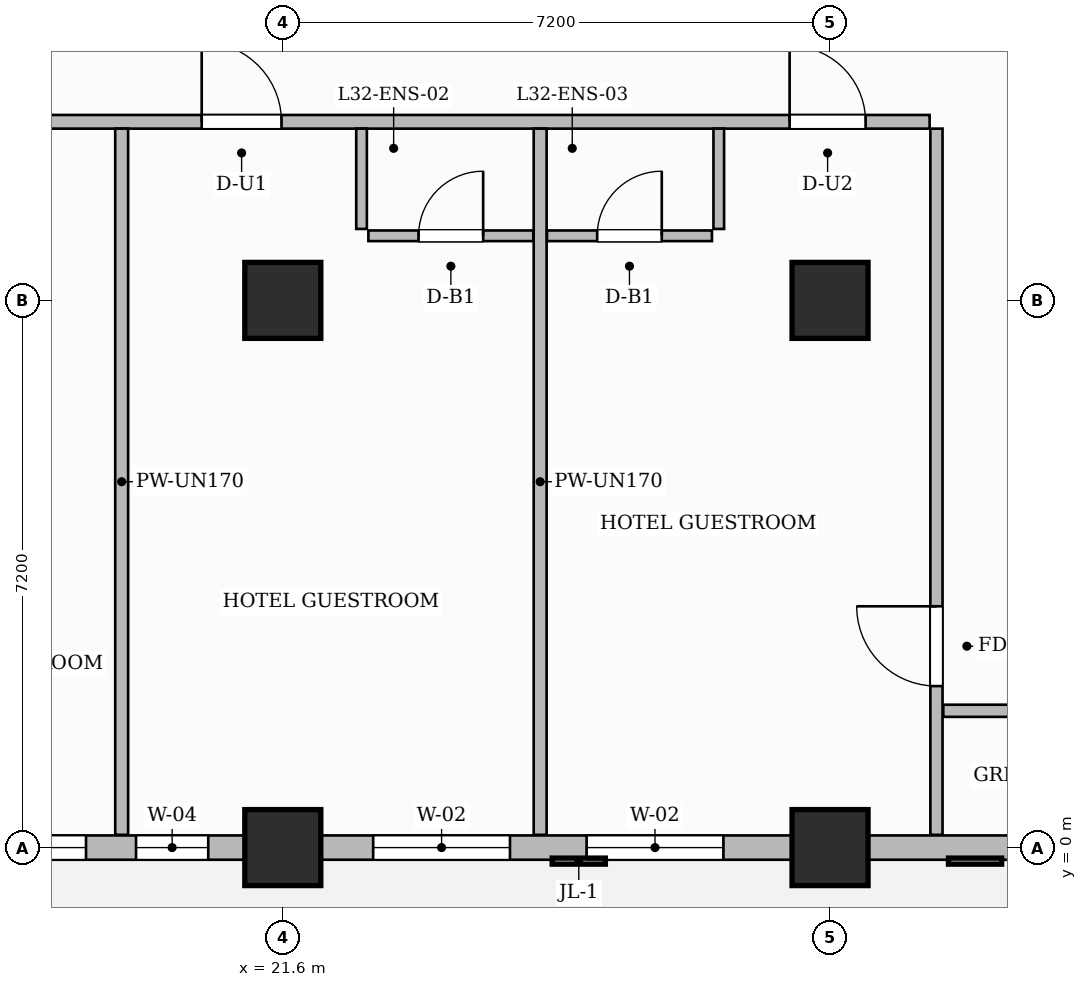
"""IFC4 building model, lengths in metres.
Left out: names, types, materials, properties, quantities, classifications, styles, units other than length and angle.
Written with IfcOpenShell. Run it as: python <this file> out.ifc"""

import sys

from ifc_helpers import new_model, si_unit, direction, frame, frame_2d, origin, origin_2d, place, context, subcontext, project, spatial, rectangle, extrude, source, transform, mapped, element, fill, save


model = new_model("IFC4")
c1 = context("Model", 3, precision=1e-05, world=origin(), true_north=direction((0.0, 1.0)))
c2 = subcontext(c1, "Body", "Model", "MODEL_VIEW")
j1 = project(units=[si_unit("LENGTHUNIT", "METRE"), si_unit("PLANEANGLEUNIT", "RADIAN")], contexts=[c1])
p1 = place(None, origin())
s1 = spatial("IfcSite", under=j1, at=p1, CompositionType="ELEMENT")
p2 = place(p1, origin())
s2 = spatial("IfcBuilding", under=s1, at=p2, CompositionType="ELEMENT")
p3 = place(p2, frame((0.0, 0.0, 130.3)))
s3 = spatial("IfcBuildingStorey", under=s2, at=p3, CompositionType="ELEMENT", Elevation=130.3)
m1 = source(origin(), c2, "Body", "SweptSolid", [
    extrude(rectangle(XDim=1.0, YDim=1.0, at=origin_2d()), origin(), (0.0, 0.0, 1.0), 3.7),
])
for number, where, z_axis, x_axis in (
    (1, (21.6, 0.0, 0.0), (0.0, 0.0, 1.0), (1.0, 0.0, 0.0)),
    (2, (21.6, 7.2, 0.0), (0.0, 0.0, 1.0), (1.0, 0.0, 0.0)),
    (3, (28.8, 0.0, 0.0), (0.0, 0.0, 1.0), (1.0, 0.0, 0.0)),
    (4, (28.8, 7.2, 0.0), (0.0, 0.0, 1.0), (1.0, 0.0, 0.0)),
):
    element("IfcColumn", number, at=place(p3, frame(where, z_axis=z_axis, x_axis=x_axis)), inside=s3, PredefinedType="COLUMN", context=c2, shape_type="MappedRepresentation", body=[
        mapped(m1, transform((0.0, 0.0, 0.0), scale=1.0)),
    ])
p4 = place(p3, frame((14.568, 9.55, 0.0), z_axis=(0.0, 0.0, 1.0), x_axis=(1.0, 0.0, 0.0)))
e5 = element("IfcWall", 5, at=p4, inside=s3, PredefinedType="PARTITIONING", context=c2, shape_type="SweptSolid", body=[
    extrude(rectangle(XDim=15.542, YDim=0.18, at=frame_2d((7.771, 0.0))), origin(), (0.0, 0.0, 1.0), 3.45),
])
p5 = place(p4, frame((2.888, 0.0, 0.0)))
e6 = element("IfcOpeningElement", 6, at=p5, cuts=e5, PredefinedType="OPENING", context=c2, shape_type="SweptSolid", body=[
    extrude(rectangle(XDim=1.0, YDim=2.2, at=frame_2d((0.5, 1.1))), frame((0.0, 0.1, 0.0), z_axis=(0.0, -1.0, 0.0), x_axis=(1.0, 0.0, 0.0)), (0.0, 0.0, 1.0), 0.2),
])
p6 = place(p4, frame((5.965, 0.0, 0.0)))
e7 = element("IfcOpeningElement", 7, at=p6, cuts=e5, PredefinedType="OPENING", context=c2, shape_type="SweptSolid", body=[
    extrude(rectangle(XDim=1.05, YDim=2.25, at=frame_2d((0.525, 1.125))), frame((0.0, 0.1, 0.0), z_axis=(0.0, -1.0, 0.0), x_axis=(1.0, 0.0, 0.0)), (0.0, 0.0, 1.0), 0.2),
])
p7 = place(p4, frame((13.7, 0.0, 0.0)))
e8 = element("IfcOpeningElement", 8, at=p7, cuts=e5, PredefinedType="OPENING", context=c2, shape_type="SweptSolid", body=[
    extrude(rectangle(XDim=1.0, YDim=2.2, at=frame_2d((0.5, 1.1))), frame((0.0, 0.1, 0.0), z_axis=(0.0, -1.0, 0.0), x_axis=(1.0, 0.0, 0.0)), (0.0, 0.0, 1.0), 0.2),
])
p8 = place(p3, frame((30.2, 0.168, 0.0), z_axis=(0.0, 0.0, 1.0), x_axis=(0.0, 1.0, 0.0)))
e9 = element("IfcWall", 9, at=p8, inside=s3, PredefinedType="PARTITIONING", context=c2, shape_type="SweptSolid", body=[
    extrude(rectangle(XDim=9.292, YDim=0.16, at=frame_2d((4.646, 0.0))), origin(), (0.0, 0.0, 1.0), 3.45),
])
p9 = place(p8, frame((1.957, 0.0, 0.0)))
e10 = element("IfcOpeningElement", 10, at=p9, cuts=e9, PredefinedType="OPENING", context=c2, shape_type="SweptSolid", body=[
    extrude(rectangle(XDim=1.05, YDim=2.15, at=frame_2d((0.525, 1.075))), frame((0.0, 0.09, 0.0), z_axis=(0.0, -1.0, 0.0), x_axis=(1.0, 0.0, 0.0)), (0.0, 0.0, 1.0), 0.18),
])
p10 = place(p3, frame((30.29, 1.8, 0.0), z_axis=(0.0, 0.0, 1.0), x_axis=(1.0, 0.0, 0.0)))
e11 = element("IfcWall", 11, at=p10, inside=s3, PredefinedType="PARTITIONING", context=c2, shape_type="SweptSolid", body=[
    extrude(rectangle(XDim=19.37, YDim=0.16, at=frame_2d((9.685, 0.0))), origin(), (0.0, 0.0, 1.0), 3.45),
])
p11 = place(p10, frame((5.074, 0.0, 0.0)))
e12 = element("IfcOpeningElement", 12, at=p11, cuts=e11, PredefinedType="OPENING", context=c2, shape_type="SweptSolid", body=[
    extrude(rectangle(XDim=0.9, YDim=2.15, at=frame_2d((0.45, 1.075))), frame((0.0, 0.09, 0.0), z_axis=(0.0, -1.0, 0.0), x_axis=(1.0, 0.0, 0.0)), (0.0, 0.0, 1.0), 0.18),
])
p12 = place(p10, frame((14.06, 0.0, 0.0)))
e13 = element("IfcOpeningElement", 13, at=p12, cuts=e11, PredefinedType="OPENING", context=c2, shape_type="SweptSolid", body=[
    extrude(rectangle(XDim=0.9, YDim=2.15, at=frame_2d((0.45, 1.075))), frame((0.0, 0.09, 0.0), z_axis=(0.0, -1.0, 0.0), x_axis=(1.0, 0.0, 0.0)), (0.0, 0.0, 1.0), 0.18),
])
p13 = place(p3, frame((19.48, 0.168, 0.0), z_axis=(0.0, 0.0, 1.0), x_axis=(0.0, 1.0, 0.0)))
e14 = element("IfcWall", 14, at=p13, inside=s3, PredefinedType="PARTITIONING", context=c2, shape_type="SweptSolid", body=[
    extrude(rectangle(XDim=9.292, YDim=0.17, at=frame_2d((4.646, 0.0))), origin(), (0.0, 0.0, 1.0), 3.45),
])
p14 = place(p3, frame((24.986, 0.168, 0.0), z_axis=(0.0, 0.0, 1.0), x_axis=(0.0, 1.0, 0.0)))
e15 = element("IfcWall", 15, at=p14, inside=s3, PredefinedType="PARTITIONING", context=c2, shape_type="SweptSolid", body=[
    extrude(rectangle(XDim=9.292, YDim=0.17, at=frame_2d((4.646, 0.0))), origin(), (0.0, 0.0, 1.0), 3.105),
])
p15 = place(p3, frame((22.636, 8.14, 0.0), z_axis=(0.0, 0.0, 1.0), x_axis=(0.0, 1.0, 0.0)))
e16 = element("IfcWall", 16, at=p15, inside=s3, PredefinedType="PARTITIONING", context=c2, shape_type="SweptSolid", body=[
    extrude(rectangle(XDim=1.32, YDim=0.14, at=frame_2d((0.66, 0.0))), origin(), (0.0, 0.0, 1.0), 3.45),
])
p16 = place(p3, frame((22.726, 8.05, 0.0), z_axis=(0.0, 0.0, 1.0), x_axis=(1.0, 0.0, 0.0)))
e17 = element("IfcWall", 17, at=p16, inside=s3, PredefinedType="PARTITIONING", context=c2, shape_type="SweptSolid", body=[
    extrude(rectangle(XDim=2.17, YDim=0.14, at=frame_2d((1.085, 0.0))), origin(), (0.0, 0.0, 1.0), 3.45),
])
p17 = place(p16, frame((0.66, 0.0, 0.0)))
e18 = element("IfcOpeningElement", 18, at=p17, cuts=e17, PredefinedType="OPENING", context=c2, shape_type="SweptSolid", body=[
    extrude(rectangle(XDim=0.85, YDim=2.1, at=frame_2d((0.425, 1.05))), frame((0.0, 0.08, 0.0), z_axis=(0.0, -1.0, 0.0), x_axis=(1.0, 0.0, 0.0)), (0.0, 0.0, 1.0), 0.16),
])
p18 = place(p3, frame((27.336, 8.14, 0.0), z_axis=(0.0, 0.0, 1.0), x_axis=(0.0, 1.0, 0.0)))
e19 = element("IfcWall", 19, at=p18, inside=s3, PredefinedType="PARTITIONING", context=c2, shape_type="SweptSolid", body=[
    extrude(rectangle(XDim=1.32, YDim=0.14, at=frame_2d((0.66, 0.0))), origin(), (0.0, 0.0, 1.0), 3.45),
])
p19 = place(p3, frame((25.076, 8.05, 0.0), z_axis=(0.0, 0.0, 1.0), x_axis=(1.0, 0.0, 0.0)))
e20 = element("IfcWall", 20, at=p19, inside=s3, PredefinedType="PARTITIONING", context=c2, shape_type="SweptSolid", body=[
    extrude(rectangle(XDim=2.17, YDim=0.14, at=frame_2d((1.085, 0.0))), origin(), (0.0, 0.0, 1.0), 3.45),
])
p20 = place(p19, frame((0.66, 0.0, 0.0)))
e21 = element("IfcOpeningElement", 21, at=p20, cuts=e20, PredefinedType="OPENING", context=c2, shape_type="SweptSolid", body=[
    extrude(rectangle(XDim=0.85, YDim=2.1, at=frame_2d((0.425, 1.05))), frame((0.0, 0.08, 0.0), z_axis=(0.0, -1.0, 0.0), x_axis=(1.0, 0.0, 0.0)), (0.0, 0.0, 1.0), 0.16),
])
p21 = place(p3, frame((14.4, 0.0, 0.0), z_axis=(0.0, 0.0, 1.0), x_axis=(1.0, 0.0, 0.0)))
e22 = element("IfcWall", 22, at=p21, inside=s3, PredefinedType="SOLIDWALL", context=c2, shape_type="SweptSolid", body=[
    extrude(rectangle(XDim=35.4, YDim=0.32, at=frame_2d((17.7, 0.0))), origin(), (0.0, 0.0, 1.0), 2.935),
])
p22 = place(p21, frame((0.85, 0.0, 0.0)))
e23 = element("IfcOpeningElement", 23, at=p22, cuts=e22, PredefinedType="OPENING", context=c2, shape_type="SweptSolid", body=[
    extrude(rectangle(XDim=1.2, YDim=2.2, at=frame_2d((0.6, 1.1))), frame((0.0, 0.17, 0.0), z_axis=(0.0, -1.0, 0.0), x_axis=(1.0, 0.0, 0.0)), (0.0, 0.0, 1.0), 0.34),
])
p23 = place(p21, frame((2.811, 0.0, 0.8)))
e24 = element("IfcOpeningElement", 24, at=p23, cuts=e22, PredefinedType="OPENING", context=c2, shape_type="SweptSolid", body=[
    extrude(rectangle(XDim=1.8, YDim=1.85, at=frame_2d((0.9, 0.925))), frame((0.0, 0.17, 0.0), z_axis=(0.0, -1.0, 0.0), x_axis=(1.0, 0.0, 0.0)), (0.0, 0.0, 1.0), 0.34),
])
p24 = place(p21, frame((5.269, 0.0, 0.8)))
e25 = element("IfcOpeningElement", 25, at=p24, cuts=e22, PredefinedType="OPENING", context=c2, shape_type="SweptSolid", body=[
    extrude(rectangle(XDim=0.95, YDim=1.75, at=frame_2d((0.475, 0.875))), frame((0.0, 0.17, 0.0), z_axis=(0.0, -1.0, 0.0), x_axis=(1.0, 0.0, 0.0)), (0.0, 0.0, 1.0), 0.34),
])
p25 = place(p21, frame((8.389, 0.0, 0.8)))
e26 = element("IfcOpeningElement", 26, at=p25, cuts=e22, PredefinedType="OPENING", context=c2, shape_type="SweptSolid", body=[
    extrude(rectangle(XDim=1.8, YDim=1.85, at=frame_2d((0.9, 0.925))), frame((0.0, 0.17, 0.0), z_axis=(0.0, -1.0, 0.0), x_axis=(1.0, 0.0, 0.0)), (0.0, 0.0, 1.0), 0.34),
])
p26 = place(p21, frame((11.197, 0.0, 0.8)))
e27 = element("IfcOpeningElement", 27, at=p26, cuts=e22, PredefinedType="OPENING", context=c2, shape_type="SweptSolid", body=[
    extrude(rectangle(XDim=1.8, YDim=1.85, at=frame_2d((0.9, 0.925))), frame((0.0, 0.17, 0.0), z_axis=(0.0, -1.0, 0.0), x_axis=(1.0, 0.0, 0.0)), (0.0, 0.0, 1.0), 0.34),
])
p27 = place(p21, frame((16.804, 0.0, 0.8)))
e28 = element("IfcOpeningElement", 28, at=p27, cuts=e22, PredefinedType="OPENING", context=c2, shape_type="SweptSolid", body=[
    extrude(rectangle(XDim=1.8, YDim=1.85, at=frame_2d((0.9, 0.925))), frame((0.0, 0.17, 0.0), z_axis=(0.0, -1.0, 0.0), x_axis=(1.0, 0.0, 0.0)), (0.0, 0.0, 1.0), 0.34),
])
p28 = place(p21, frame((22.396, 0.0, 0.8)))
e29 = element("IfcOpeningElement", 29, at=p28, cuts=e22, PredefinedType="OPENING", context=c2, shape_type="SweptSolid", body=[
    extrude(rectangle(XDim=1.8, YDim=1.85, at=frame_2d((0.9, 0.925))), frame((0.0, 0.17, 0.0), z_axis=(0.0, -1.0, 0.0), x_axis=(1.0, 0.0, 0.0)), (0.0, 0.0, 1.0), 0.34),
])
p29 = place(p21, frame((25.629, 0.0, 0.8)))
e30 = element("IfcOpeningElement", 30, at=p29, cuts=e22, PredefinedType="OPENING", context=c2, shape_type="SweptSolid", body=[
    extrude(rectangle(XDim=0.95, YDim=1.75, at=frame_2d((0.475, 0.875))), frame((0.0, 0.17, 0.0), z_axis=(0.0, -1.0, 0.0), x_axis=(1.0, 0.0, 0.0)), (0.0, 0.0, 1.0), 0.34),
])
p30 = place(p21, frame((29.075, 0.0, 0.8)))
e31 = element("IfcOpeningElement", 31, at=p30, cuts=e22, PredefinedType="OPENING", context=c2, shape_type="SweptSolid", body=[
    extrude(rectangle(XDim=1.8, YDim=1.85, at=frame_2d((0.9, 0.925))), frame((0.0, 0.17, 0.0), z_axis=(0.0, -1.0, 0.0), x_axis=(1.0, 0.0, 0.0)), (0.0, 0.0, 1.0), 0.34),
])
p31 = place(p21, frame((32.125, 0.0, 0.8)))
e32 = element("IfcOpeningElement", 32, at=p31, cuts=e22, PredefinedType="OPENING", context=c2, shape_type="SweptSolid", body=[
    extrude(rectangle(XDim=1.8, YDim=1.85, at=frame_2d((0.9, 0.925))), frame((0.0, 0.17, 0.0), z_axis=(0.0, -1.0, 0.0), x_axis=(1.0, 0.0, 0.0)), (0.0, 0.0, 1.0), 0.34),
])
m2 = source(origin(), c2, "Body", "SweptSolid", [
    extrude(rectangle(XDim=1.05, YDim=2.15, at=frame_2d((0.525, 1.075))), frame((0.0, 0.025, 0.0), z_axis=(0.0, -1.0, 0.0), x_axis=(1.0, 0.0, 0.0)), (0.0, 0.0, 1.0), 0.05),
])
p32 = place(p9, origin())
e33 = element("IfcDoor", 33, at=p32, inside=s3, OperationType="SINGLE_SWING_RIGHT", PredefinedType="DOOR", context=c2, shape_type="MappedRepresentation", body=[
    mapped(m2, transform((0.0, 0.0, 0.0), scale=1.0)),
])
fill(e10, e33)
m3 = source(origin(), c2, "Body", "SweptSolid", [
    extrude(rectangle(XDim=0.85, YDim=2.1, at=frame_2d((0.425, 1.05))), frame((0.0, 0.025, 0.0), z_axis=(0.0, -1.0, 0.0), x_axis=(1.0, 0.0, 0.0)), (0.0, 0.0, 1.0), 0.05),
])
p33 = place(p17, origin())
e34 = element("IfcDoor", 34, at=p33, inside=s3, OperationType="SINGLE_SWING_RIGHT", PredefinedType="DOOR", context=c2, shape_type="MappedRepresentation", body=[
    mapped(m3, transform((0.0, 0.0, 0.0), scale=1.0)),
])
fill(e18, e34)
m4 = source(origin(), c2, "Body", "SweptSolid", [
    extrude(rectangle(XDim=1.05, YDim=2.25, at=frame_2d((0.525, 1.125))), frame((0.0, 0.025, 0.0), z_axis=(0.0, -1.0, 0.0), x_axis=(1.0, 0.0, 0.0)), (0.0, 0.0, 1.0), 0.05),
])
p34 = place(p6, origin())
e35 = element("IfcDoor", 35, at=p34, inside=s3, OperationType="SINGLE_SWING_LEFT", PredefinedType="DOOR", context=c2, shape_type="MappedRepresentation", body=[
    mapped(m4, transform((0.0, 0.0, 0.0), scale=1.0)),
])
fill(e7, e35)
p35 = place(p20, origin())
e36 = element("IfcDoor", 36, at=p35, inside=s3, OperationType="SINGLE_SWING_RIGHT", PredefinedType="DOOR", context=c2, shape_type="MappedRepresentation", body=[
    mapped(m3, transform((0.0, 0.0, 0.0), scale=1.0)),
])
fill(e21, e36)
m5 = source(origin(), c2, "Body", "SweptSolid", [
    extrude(rectangle(XDim=1.0, YDim=2.2, at=frame_2d((0.5, 1.1))), frame((0.0, 0.025, 0.0), z_axis=(0.0, -1.0, 0.0), x_axis=(1.0, 0.0, 0.0)), (0.0, 0.0, 1.0), 0.05),
])
p36 = place(p7, origin())
e37 = element("IfcDoor", 37, at=p36, inside=s3, OperationType="SINGLE_SWING_LEFT", PredefinedType="DOOR", context=c2, shape_type="MappedRepresentation", body=[
    mapped(m5, transform((0.0, 0.0, 0.0), scale=1.0)),
])
fill(e8, e37)
m6 = source(origin(), c2, "Body", "SweptSolid", [
    extrude(rectangle(XDim=1.8, YDim=1.85, at=frame_2d((0.9, 0.925))), frame((0.0, 0.03, 0.0), z_axis=(0.0, -1.0, 0.0), x_axis=(1.0, 0.0, 0.0)), (0.0, 0.0, 1.0), 0.06),
])
p37 = place(p23, origin())
e38 = element("IfcWindow", 38, at=p37, inside=s3, PartitioningType="DOUBLE_PANEL_VERTICAL", PredefinedType="WINDOW", context=c2, shape_type="MappedRepresentation", body=[
    mapped(m6, transform((0.0, 0.0, 0.0), scale=1.0)),
])
fill(e24, e38)
m7 = source(origin(), c2, "Body", "SweptSolid", [
    extrude(rectangle(XDim=0.95, YDim=1.75, at=frame_2d((0.475, 0.875))), frame((0.0, 0.03, 0.0), z_axis=(0.0, -1.0, 0.0), x_axis=(1.0, 0.0, 0.0)), (0.0, 0.0, 1.0), 0.06),
])
p38 = place(p24, origin())
e39 = element("IfcWindow", 39, at=p38, inside=s3, PartitioningType="SINGLE_PANEL", PredefinedType="WINDOW", context=c2, shape_type="MappedRepresentation", body=[
    mapped(m7, transform((0.0, 0.0, 0.0), scale=1.0)),
])
fill(e25, e39)
p39 = place(p25, origin())
e40 = element("IfcWindow", 40, at=p39, inside=s3, PartitioningType="DOUBLE_PANEL_VERTICAL", PredefinedType="WINDOW", context=c2, shape_type="MappedRepresentation", body=[
    mapped(m6, transform((0.0, 0.0, 0.0), scale=1.0)),
])
fill(e26, e40)
p40 = place(p26, origin())
e41 = element("IfcWindow", 41, at=p40, inside=s3, PartitioningType="DOUBLE_PANEL_VERTICAL", PredefinedType="WINDOW", context=c2, shape_type="MappedRepresentation", body=[
    mapped(m6, transform((0.0, 0.0, 0.0), scale=1.0)),
])
fill(e27, e41)
save(model, sys.argv[1])
